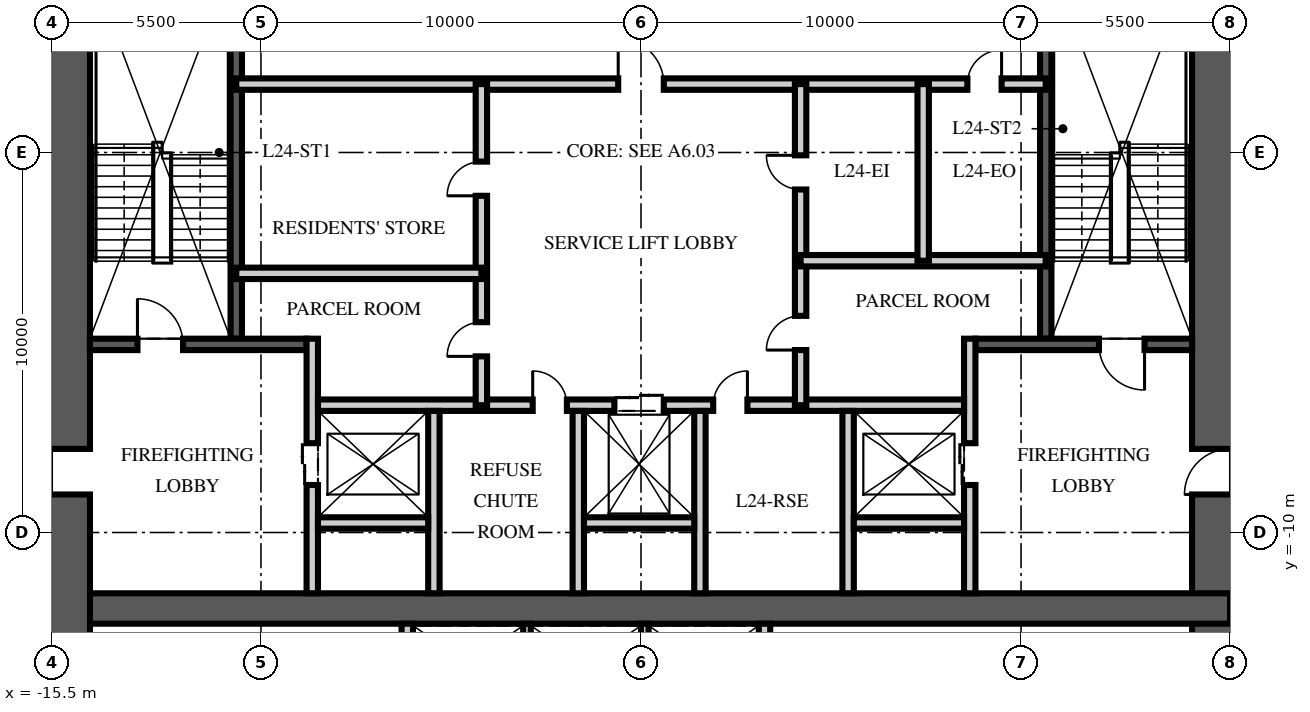
"""IFC4 building model, lengths in metres.
Left out: names, types, materials, properties, quantities, classifications, styles, units other than length and angle.
Written with IfcOpenShell. Run it as: python <this file> out.ifc"""

import sys

from ifc_helpers import new_model, si_unit, direction, frame, frame_2d, origin, place, context, subcontext, project, spatial, rectangle, extrude, element, fill, save


model = new_model("IFC4")
c1 = context("Model", 3, precision=1e-05, world=origin(), true_north=direction((0.0, 1.0)))
c2 = subcontext(c1, "Body", "Model", "MODEL_VIEW")
j1 = project(units=[si_unit("LENGTHUNIT", "METRE"), si_unit("PLANEANGLEUNIT", "RADIAN")], contexts=[c1])
p1 = place(None, origin())
s1 = spatial("IfcSite", under=j1, at=p1, CompositionType="ELEMENT")
p2 = place(p1, origin())
s2 = spatial("IfcBuilding", under=s1, at=p2, CompositionType="ELEMENT")
p3 = place(p2, frame((0.0, 0.0, 96.0)))
s3 = spatial("IfcBuildingStorey", under=s2, at=p3, CompositionType="ELEMENT", Elevation=96.0)
p4 = place(p3, frame((15.5, -15.5, -0.25), z_axis=(0.0, 0.0, 1.0), x_axis=(0.0, 1.0, 0.0)))
e1 = element("IfcWall", 1, at=p4, inside=s3, PredefinedType="SHEAR", context=c2, shape_type="SweptSolid", body=[
    extrude(rectangle(XDim=31.0, YDim=2.0, at=frame_2d((15.5, 0.0))), origin(), (0.0, 0.0, 1.0), 3.65),
])
p5 = place(p4, frame((6.5, 0.0, 0.25)))
e2 = element("IfcOpeningElement", 2, at=p5, cuts=e1, PredefinedType="OPENING", context=c2, shape_type="SweptSolid", body=[
    extrude(rectangle(XDim=1.2, YDim=2.1, at=frame_2d((0.6, 1.05))), frame((0.0, 1.01, 0.0), z_axis=(0.0, -1.0, 0.0), x_axis=(1.0, 0.0, 0.0)), (0.0, 0.0, 1.0), 2.02),
])
p6 = place(p4, frame((23.0, 0.0, 0.25)))
e3 = element("IfcOpeningElement", 3, at=p6, cuts=e1, PredefinedType="OPENING", context=c2, shape_type="SweptSolid", body=[
    extrude(rectangle(XDim=1.8, YDim=2.1, at=frame_2d((0.9, 1.05))), frame((0.0, 1.01, 0.0), z_axis=(0.0, -1.0, 0.0), x_axis=(1.0, 0.0, 0.0)), (0.0, 0.0, 1.0), 2.02),
])
p7 = place(p3, frame((-15.5, -12.0, -0.25), z_axis=(0.0, 0.0, 1.0), x_axis=(1.0, 0.0, 0.0)))
e4 = element("IfcWall", 4, at=p7, inside=s3, PredefinedType="SHEAR", context=c2, shape_type="SweptSolid", body=[
    extrude(rectangle(XDim=31.0, YDim=0.8, at=frame_2d((15.5, 0.0))), origin(), (0.0, 0.0, 1.0), 3.65),
])
p8 = place(p3, frame((-15.5, -15.5, -0.25), z_axis=(0.0, 0.0, 1.0), x_axis=(0.0, 1.0, 0.0)))
e5 = element("IfcWall", 5, at=p8, inside=s3, PredefinedType="SHEAR", context=c2, shape_type="SweptSolid", body=[
    extrude(rectangle(XDim=31.0, YDim=2.0, at=frame_2d((15.5, 0.0))), origin(), (0.0, 0.0, 1.0), 3.65),
])
p9 = place(p8, frame((6.5, 0.0, 0.25)))
e6 = element("IfcOpeningElement", 6, at=p9, cuts=e5, PredefinedType="OPENING", context=c2, shape_type="SweptSolid", body=[
    extrude(rectangle(XDim=1.2, YDim=2.1, at=frame_2d((0.6, 1.05))), frame((0.0, 1.01, 0.0), z_axis=(0.0, -1.0, 0.0), x_axis=(1.0, 0.0, 0.0)), (0.0, 0.0, 1.0), 2.02),
])
p10 = place(p8, frame((23.0, 0.0, 0.25)))
e7 = element("IfcOpeningElement", 7, at=p10, cuts=e5, PredefinedType="OPENING", context=c2, shape_type="SweptSolid", body=[
    extrude(rectangle(XDim=1.8, YDim=2.1, at=frame_2d((0.9, 1.05))), frame((0.0, 1.01, 0.0), z_axis=(0.0, -1.0, 0.0), x_axis=(1.0, 0.0, 0.0)), (0.0, 0.0, 1.0), 2.02),
])
p11 = place(p3, frame((-10.65, -4.9, 0.0), z_axis=(0.0, 0.0, 1.0), x_axis=(0.0, 1.0, 0.0)))
e8 = element("IfcWall", 8, at=p11, inside=s3, PredefinedType="SOLIDWALL", context=c2, shape_type="SweptSolid", body=[
    extrude(rectangle(XDim=10.1, YDim=0.3, at=frame_2d((5.05, 0.0))), origin(), (0.0, 0.0, 1.0), 3.4),
])
p12 = place(p3, frame((-14.5, -5.05, 0.0), z_axis=(0.0, 0.0, 1.0), x_axis=(1.0, 0.0, 0.0)))
e9 = element("IfcWall", 9, at=p12, inside=s3, PredefinedType="SOLIDWALL", context=c2, shape_type="SweptSolid", body=[
    extrude(rectangle(XDim=5.7, YDim=0.3, at=frame_2d((2.85, 0.0))), origin(), (0.0, 0.0, 1.0), 3.4),
])
p13 = place(p12, frame((1.25, 0.0, 0.0)))
e10 = element("IfcOpeningElement", 10, at=p13, cuts=e9, PredefinedType="OPENING", context=c2, shape_type="SweptSolid", body=[
    extrude(rectangle(XDim=1.2, YDim=2.1, at=frame_2d((0.6, 1.05))), frame((0.0, 0.16, 0.0), z_axis=(0.0, -1.0, 0.0), x_axis=(1.0, 0.0, 0.0)), (0.0, 0.0, 1.0), 0.32),
])
p14 = place(p3, frame((-8.65, -11.6, 0.0), z_axis=(0.0, 0.0, 1.0), x_axis=(0.0, 1.0, 0.0)))
e11 = element("IfcWall", 11, at=p14, inside=s3, PredefinedType="PARTITIONING", context=c2, shape_type="SweptSolid", body=[
    extrude(rectangle(XDim=6.7, YDim=0.3, at=frame_2d((3.35, 0.0))), origin(), (0.0, 0.0, 1.0), 3.4),
])
p15 = place(p14, frame((2.85, 0.0, 0.0)))
e12 = element("IfcOpeningElement", 12, at=p15, cuts=e11, PredefinedType="OPENING", context=c2, shape_type="SweptSolid", body=[
    extrude(rectangle(XDim=1.1, YDim=2.1, at=frame_2d((0.55, 1.05))), frame((0.0, 0.16, 0.0), z_axis=(0.0, -1.0, 0.0), x_axis=(1.0, 0.0, 0.0)), (0.0, 0.0, 1.0), 0.32),
])
p16 = place(p3, frame((10.65, -4.9, 0.0), z_axis=(0.0, 0.0, 1.0), x_axis=(0.0, 1.0, 0.0)))
e13 = element("IfcWall", 13, at=p16, inside=s3, PredefinedType="SOLIDWALL", context=c2, shape_type="SweptSolid", body=[
    extrude(rectangle(XDim=10.1, YDim=0.3, at=frame_2d((5.05, 0.0))), origin(), (0.0, 0.0, 1.0), 3.4),
])
p17 = place(p3, frame((14.5, -5.05, 0.0), z_axis=(0.0, 0.0, 1.0), x_axis=(-1.0, 0.0, 0.0)))
e14 = element("IfcWall", 14, at=p17, inside=s3, PredefinedType="SOLIDWALL", context=c2, shape_type="SweptSolid", body=[
    extrude(rectangle(XDim=5.7, YDim=0.3, at=frame_2d((2.85, 0.0))), origin(), (0.0, 0.0, 1.0), 3.4),
])
p18 = place(p17, frame((1.25, 0.0, 0.0)))
e15 = element("IfcOpeningElement", 15, at=p18, cuts=e14, PredefinedType="OPENING", context=c2, shape_type="SweptSolid", body=[
    extrude(rectangle(XDim=1.2, YDim=2.1, at=frame_2d((0.6, 1.05))), frame((0.0, 0.16, 0.0), z_axis=(0.0, -1.0, 0.0), x_axis=(1.0, 0.0, 0.0)), (0.0, 0.0, 1.0), 0.32),
])
p19 = place(p3, frame((8.65, -11.6, 0.0), z_axis=(0.0, 0.0, 1.0), x_axis=(0.0, 1.0, 0.0)))
e16 = element("IfcWall", 16, at=p19, inside=s3, PredefinedType="PARTITIONING", context=c2, shape_type="SweptSolid", body=[
    extrude(rectangle(XDim=6.7, YDim=0.3, at=frame_2d((3.35, 0.0))), origin(), (0.0, 0.0, 1.0), 3.4),
])
p20 = place(p19, frame((2.85, 0.0, 0.0)))
e17 = element("IfcOpeningElement", 17, at=p20, cuts=e16, PredefinedType="OPENING", context=c2, shape_type="SweptSolid", body=[
    extrude(rectangle(XDim=1.1, YDim=2.1, at=frame_2d((0.55, 1.05))), frame((0.0, 0.16, 0.0), z_axis=(0.0, -1.0, 0.0), x_axis=(1.0, 0.0, 0.0)), (0.0, 0.0, 1.0), 0.32),
])
p21 = place(p3, frame((-8.5, -6.65, 0.0), z_axis=(0.0, 0.0, 1.0), x_axis=(1.0, 0.0, 0.0)))
e18 = element("IfcWall", 18, at=p21, inside=s3, PredefinedType="PARTITIONING", context=c2, shape_type="SweptSolid", body=[
    extrude(rectangle(XDim=17.0, YDim=0.3, at=frame_2d((8.5, 0.0))), origin(), (0.0, 0.0, 1.0), 3.4),
])
p22 = place(p21, frame((7.8, 0.0, 0.0)))
e19 = element("IfcOpeningElement", 19, at=p22, cuts=e18, PredefinedType="OPENING", context=c2, shape_type="SweptSolid", body=[
    extrude(rectangle(XDim=1.3, YDim=2.4, at=frame_2d((0.65, 1.2))), frame((0.0, 0.16, 0.0), z_axis=(0.0, -1.0, 0.0), x_axis=(1.0, 0.0, 0.0)), (0.0, 0.0, 1.0), 0.32),
])
p23 = place(p21, frame((5.65, 0.0, 0.0)))
e20 = element("IfcOpeningElement", 20, at=p23, cuts=e18, PredefinedType="OPENING", context=c2, shape_type="SweptSolid", body=[
    extrude(rectangle(XDim=0.9, YDim=2.1, at=frame_2d((0.45, 1.05))), frame((0.0, 0.16, 0.0), z_axis=(0.0, -1.0, 0.0), x_axis=(1.0, 0.0, 0.0)), (0.0, 0.0, 1.0), 0.32),
])
p24 = place(p21, frame((10.4, 0.0, 0.0)))
e21 = element("IfcOpeningElement", 21, at=p24, cuts=e18, PredefinedType="OPENING", context=c2, shape_type="SweptSolid", body=[
    extrude(rectangle(XDim=0.9, YDim=2.1, at=frame_2d((0.45, 1.05))), frame((0.0, 0.16, 0.0), z_axis=(0.0, -1.0, 0.0), x_axis=(1.0, 0.0, 0.0)), (0.0, 0.0, 1.0), 0.32),
])
for number, where, z_axis, x_axis in (
    (22, (-5.45, -11.6, 0.0), (0.0, 0.0, 1.0), (0.0, 1.0, 0.0)),
    (23, (-1.65, -11.6, 0.0), (0.0, 0.0, 1.0), (0.0, 1.0, 0.0)),
    (24, (1.55, -11.6, 0.0), (0.0, 0.0, 1.0), (0.0, 1.0, 0.0)),
    (25, (5.45, -11.6, 0.0), (0.0, 0.0, 1.0), (0.0, 1.0, 0.0)),
):
    element("IfcWall", number, at=place(p3, frame(where, z_axis=z_axis, x_axis=x_axis)), inside=s3, PredefinedType="PARTITIONING", context=c2, shape_type="SweptSolid", body=[
        extrude(rectangle(XDim=4.8, YDim=0.3, at=frame_2d((2.4, 0.0))), origin(), (0.0, 0.0, 1.0), 3.4),
    ])
for number, where, z_axis, x_axis in (
    (26, (-8.5, -9.75, 0.0), (0.0, 0.0, 1.0), (1.0, 0.0, 0.0)),
    (27, (-1.5, -9.75, 0.0), (0.0, 0.0, 1.0), (1.0, 0.0, 0.0)),
    (28, (5.6, -9.75, 0.0), (0.0, 0.0, 1.0), (1.0, 0.0, 0.0)),
):
    element("IfcWall", number, at=place(p3, frame(where, z_axis=z_axis, x_axis=x_axis)), inside=s3, PredefinedType="PARTITIONING", context=c2, shape_type="SweptSolid", body=[
        extrude(rectangle(XDim=2.9, YDim=0.3, at=frame_2d((1.45, 0.0))), origin(), (0.0, 0.0, 1.0), 3.4),
    ])
for number, where, z_axis, x_axis in (
    (29, (-6.15, -14.5, 0.0), (0.0, 0.0, 1.0), (0.0, 1.0, 0.0)),
    (30, (3.25, -14.5, 0.0), (0.0, 0.0, 1.0), (0.0, 1.0, 0.0)),
):
    element("IfcWall", number, at=place(p3, frame(where, z_axis=z_axis, x_axis=x_axis)), inside=s3, PredefinedType="PARTITIONING", context=c2, shape_type="SweptSolid", body=[
        extrude(rectangle(XDim=2.1, YDim=0.3, at=frame_2d((1.05, 0.0))), origin(), (0.0, 0.0, 1.0), 3.4),
    ])
for number, where, z_axis, x_axis in (
    (31, (-3.0, -14.5, 0.0), (0.0, 0.0, 1.0), (0.0, 1.0, 0.0)),
    (32, (0.1, -14.5, 0.0), (0.0, 0.0, 1.0), (0.0, 1.0, 0.0)),
):
    element("IfcWall", number, at=place(p3, frame(where, z_axis=z_axis, x_axis=x_axis)), inside=s3, PredefinedType="PARTITIONING", context=c2, shape_type="SweptSolid", body=[
        extrude(rectangle(XDim=2.1, YDim=0.2, at=frame_2d((1.05, 0.0))), origin(), (0.0, 0.0, 1.0), 3.4),
    ])
p25 = place(p3, frame((-10.65, 1.8, 0.0), z_axis=(0.0, 0.0, 1.0), x_axis=(1.0, 0.0, 0.0)))
e33 = element("IfcWall", 33, at=p25, inside=s3, PredefinedType="PARTITIONING", context=c2, shape_type="SweptSolid", body=[
    extrude(rectangle(XDim=21.3, YDim=0.3, at=frame_2d((10.65, 0.0))), origin(), (0.0, 0.0, 1.0), 3.4),
])
p26 = place(p25, frame((10.05, 0.0, 0.0)))
e34 = element("IfcOpeningElement", 34, at=p26, cuts=e33, PredefinedType="OPENING", context=c2, shape_type="SweptSolid", body=[
    extrude(rectangle(XDim=1.2, YDim=2.1, at=frame_2d((0.6, 1.05))), frame((0.0, 0.16, 0.0), z_axis=(0.0, -1.0, 0.0), x_axis=(1.0, 0.0, 0.0)), (0.0, 0.0, 1.0), 0.32),
])
p27 = place(p25, frame((19.238, 0.0, 0.0)))
e35 = element("IfcOpeningElement", 35, at=p27, cuts=e33, PredefinedType="OPENING", context=c2, shape_type="SweptSolid", body=[
    extrude(rectangle(XDim=0.9, YDim=2.1, at=frame_2d((0.45, 1.05))), frame((0.0, 0.16, 0.0), z_axis=(0.0, -1.0, 0.0), x_axis=(1.0, 0.0, 0.0)), (0.0, 0.0, 1.0), 0.32),
])
p28 = place(p3, frame((-4.2, -6.65, 0.0), z_axis=(0.0, 0.0, 1.0), x_axis=(0.0, 1.0, 0.0)))
e36 = element("IfcWall", 36, at=p28, inside=s3, PredefinedType="PARTITIONING", context=c2, shape_type="SweptSolid", body=[
    extrude(rectangle(XDim=8.45, YDim=0.3, at=frame_2d((4.225, 0.0))), origin(), (0.0, 0.0, 1.0), 3.4),
])
p29 = place(p28, frame((1.285, 0.0, 0.0)))
e37 = element("IfcOpeningElement", 37, at=p29, cuts=e36, PredefinedType="OPENING", context=c2, shape_type="SweptSolid", body=[
    extrude(rectangle(XDim=0.9, YDim=2.1, at=frame_2d((0.45, 1.05))), frame((0.0, 0.16, 0.0), z_axis=(0.0, -1.0, 0.0), x_axis=(1.0, 0.0, 0.0)), (0.0, 0.0, 1.0), 0.32),
])
p30 = place(p28, frame((5.51, 0.0, 0.0)))
e38 = element("IfcOpeningElement", 38, at=p30, cuts=e36, PredefinedType="OPENING", context=c2, shape_type="SweptSolid", body=[
    extrude(rectangle(XDim=0.9, YDim=2.1, at=frame_2d((0.45, 1.05))), frame((0.0, 0.16, 0.0), z_axis=(0.0, -1.0, 0.0), x_axis=(1.0, 0.0, 0.0)), (0.0, 0.0, 1.0), 0.32),
])
p31 = place(p3, frame((4.2, -6.65, 0.0), z_axis=(0.0, 0.0, 1.0), x_axis=(0.0, 1.0, 0.0)))
e39 = element("IfcWall", 39, at=p31, inside=s3, PredefinedType="PARTITIONING", context=c2, shape_type="SweptSolid", body=[
    extrude(rectangle(XDim=8.45, YDim=0.3, at=frame_2d((4.225, 0.0))), origin(), (0.0, 0.0, 1.0), 3.4),
])
p32 = place(p31, frame((1.451, 0.0, 0.0)))
e40 = element("IfcOpeningElement", 40, at=p32, cuts=e39, PredefinedType="OPENING", context=c2, shape_type="SweptSolid", body=[
    extrude(rectangle(XDim=0.9, YDim=2.1, at=frame_2d((0.45, 1.05))), frame((0.0, 0.16, 0.0), z_axis=(0.0, -1.0, 0.0), x_axis=(1.0, 0.0, 0.0)), (0.0, 0.0, 1.0), 0.32),
])
p33 = place(p31, frame((5.676, 0.0, 0.0)))
e41 = element("IfcOpeningElement", 41, at=p33, cuts=e39, PredefinedType="OPENING", context=c2, shape_type="SweptSolid", body=[
    extrude(rectangle(XDim=0.9, YDim=2.1, at=frame_2d((0.45, 1.05))), frame((0.0, 0.16, 0.0), z_axis=(0.0, -1.0, 0.0), x_axis=(1.0, 0.0, 0.0)), (0.0, 0.0, 1.0), 0.32),
])
for number, where, z_axis, x_axis in (
    (42, (-10.65, -3.18, 0.0), (0.0, 0.0, 1.0), (1.0, 0.0, 0.0)),
    (43, (10.65, -2.848, 0.0), (0.0, 0.0, 1.0), (-1.0, 0.0, 0.0)),
):
    element("IfcWall", number, at=place(p3, frame(where, z_axis=z_axis, x_axis=x_axis)), inside=s3, PredefinedType="PARTITIONING", context=c2, shape_type="SweptSolid", body=[
        extrude(rectangle(XDim=6.45, YDim=0.3, at=frame_2d((3.225, 0.0))), origin(), (0.0, 0.0, 1.0), 3.4),
    ])
p34 = place(p3, frame((7.425, -2.848, 0.0), z_axis=(0.0, 0.0, 1.0), x_axis=(0.0, 1.0, 0.0)))
e44 = element("IfcWall", 44, at=p34, inside=s3, PredefinedType="PARTITIONING", context=c2, shape_type="SweptSolid", body=[
    extrude(rectangle(XDim=4.648, YDim=0.3, at=frame_2d((2.324, 0.0))), origin(), (0.0, 0.0, 1.0), 3.4),
])
p35 = place(p13, origin())
e45 = element("IfcDoor", 45, at=p35, inside=s3, OperationType="SINGLE_SWING_LEFT", PredefinedType="DOOR", context=c2, shape_type="SweptSolid", body=[
    extrude(rectangle(XDim=1.2, YDim=2.1, at=frame_2d((0.6, 1.05))), frame((0.0, 0.025, 0.0), z_axis=(0.0, -1.0, 0.0), x_axis=(1.0, 0.0, 0.0)), (0.0, 0.0, 1.0), 0.05),
])
fill(e10, e45)
p36 = place(p9, origin())
e46 = element("IfcDoor", 46, at=p36, inside=s3, OperationType="SINGLE_SWING_LEFT", PredefinedType="DOOR", context=c2, shape_type="SweptSolid", body=[
    extrude(rectangle(XDim=1.2, YDim=2.1, at=frame_2d((0.6, 1.05))), frame((0.0, 0.025, 0.0), z_axis=(0.0, -1.0, 0.0), x_axis=(1.0, 0.0, 0.0)), (0.0, 0.0, 1.0), 0.05),
])
fill(e6, e46)
p37 = place(p18, origin())
e47 = element("IfcDoor", 47, at=p37, inside=s3, OperationType="SINGLE_SWING_LEFT", PredefinedType="DOOR", context=c2, shape_type="SweptSolid", body=[
    extrude(rectangle(XDim=1.2, YDim=2.1, at=frame_2d((0.6, 1.05))), frame((0.0, 0.025, 0.0), z_axis=(0.0, -1.0, 0.0), x_axis=(1.0, 0.0, 0.0)), (0.0, 0.0, 1.0), 0.05),
])
fill(e15, e47)
p38 = place(p5, origin())
e48 = element("IfcDoor", 48, at=p38, inside=s3, OperationType="SINGLE_SWING_LEFT", PredefinedType="DOOR", context=c2, shape_type="SweptSolid", body=[
    extrude(rectangle(XDim=1.2, YDim=2.1, at=frame_2d((0.6, 1.05))), frame((0.0, 0.025, 0.0), z_axis=(0.0, -1.0, 0.0), x_axis=(1.0, 0.0, 0.0)), (0.0, 0.0, 1.0), 0.05),
])
fill(e2, e48)
p39 = place(p15, origin())
e49 = element("IfcDoor", 49, at=p39, inside=s3, OperationType="DOUBLE_DOOR_SLIDING", PredefinedType="DOOR", context=c2, shape_type="SweptSolid", body=[
    extrude(rectangle(XDim=1.1, YDim=2.1, at=frame_2d((0.55, 1.05))), frame((0.0, 0.025, 0.0), z_axis=(0.0, -1.0, 0.0), x_axis=(1.0, 0.0, 0.0)), (0.0, 0.0, 1.0), 0.05),
])
fill(e12, e49)
p40 = place(p20, origin())
e50 = element("IfcDoor", 50, at=p40, inside=s3, OperationType="DOUBLE_DOOR_SLIDING", PredefinedType="DOOR", context=c2, shape_type="SweptSolid", body=[
    extrude(rectangle(XDim=1.1, YDim=2.1, at=frame_2d((0.55, 1.05))), frame((0.0, 0.025, 0.0), z_axis=(0.0, -1.0, 0.0), x_axis=(1.0, 0.0, 0.0)), (0.0, 0.0, 1.0), 0.05),
])
fill(e17, e50)
p41 = place(p22, origin())
e51 = element("IfcDoor", 51, at=p41, inside=s3, OperationType="DOUBLE_DOOR_SLIDING", PredefinedType="DOOR", context=c2, shape_type="SweptSolid", body=[
    extrude(rectangle(XDim=1.3, YDim=2.4, at=frame_2d((0.65, 1.2))), frame((0.0, 0.025, 0.0), z_axis=(0.0, -1.0, 0.0), x_axis=(1.0, 0.0, 0.0)), (0.0, 0.0, 1.0), 0.05),
])
fill(e19, e51)
p42 = place(p26, origin())
e52 = element("IfcDoor", 52, at=p42, inside=s3, OperationType="SINGLE_SWING_LEFT", PredefinedType="DOOR", context=c2, shape_type="SweptSolid", body=[
    extrude(rectangle(XDim=1.2, YDim=2.1, at=frame_2d((0.6, 1.05))), frame((0.0, 0.025, 0.0), z_axis=(0.0, -1.0, 0.0), x_axis=(1.0, 0.0, 0.0)), (0.0, 0.0, 1.0), 0.05),
])
fill(e34, e52)
p43 = place(p23, origin())
e53 = element("IfcDoor", 53, at=p43, inside=s3, OperationType="SINGLE_SWING_LEFT", PredefinedType="DOOR", context=c2, shape_type="SweptSolid", body=[
    extrude(rectangle(XDim=0.9, YDim=2.1, at=frame_2d((0.45, 1.05))), frame((0.0, 0.025, 0.0), z_axis=(0.0, -1.0, 0.0), x_axis=(1.0, 0.0, 0.0)), (0.0, 0.0, 1.0), 0.05),
])
fill(e20, e53)
p44 = place(p24, origin())
e54 = element("IfcDoor", 54, at=p44, inside=s3, OperationType="SINGLE_SWING_RIGHT", PredefinedType="DOOR", context=c2, shape_type="SweptSolid", body=[
    extrude(rectangle(XDim=0.9, YDim=2.1, at=frame_2d((0.45, 1.05))), frame((0.0, 0.025, 0.0), z_axis=(0.0, -1.0, 0.0), x_axis=(1.0, 0.0, 0.0)), (0.0, 0.0, 1.0), 0.05),
])
fill(e21, e54)
p45 = place(p29, origin())
e55 = element("IfcDoor", 55, at=p45, inside=s3, OperationType="SINGLE_SWING_LEFT", PredefinedType="DOOR", context=c2, shape_type="SweptSolid", body=[
    extrude(rectangle(XDim=0.9, YDim=2.1, at=frame_2d((0.45, 1.05))), frame((0.0, 0.025, 0.0), z_axis=(0.0, -1.0, 0.0), x_axis=(1.0, 0.0, 0.0)), (0.0, 0.0, 1.0), 0.05),
])
fill(e37, e55)
p46 = place(p30, origin())
e56 = element("IfcDoor", 56, at=p46, inside=s3, OperationType="SINGLE_SWING_LEFT", PredefinedType="DOOR", context=c2, shape_type="SweptSolid", body=[
    extrude(rectangle(XDim=0.9, YDim=2.1, at=frame_2d((0.45, 1.05))), frame((0.0, 0.025, 0.0), z_axis=(0.0, -1.0, 0.0), x_axis=(1.0, 0.0, 0.0)), (0.0, 0.0, 1.0), 0.05),
])
fill(e38, e56)
p47 = place(p32, origin())
e57 = element("IfcDoor", 57, at=p47, inside=s3, OperationType="SINGLE_SWING_LEFT", PredefinedType="DOOR", context=c2, shape_type="SweptSolid", body=[
    extrude(rectangle(XDim=0.9, YDim=2.1, at=frame_2d((0.45, 1.05))), frame((0.0, 0.025, 0.0), z_axis=(0.0, -1.0, 0.0), x_axis=(1.0, 0.0, 0.0)), (0.0, 0.0, 1.0), 0.05),
])
fill(e40, e57)
p48 = place(p33, origin())
e58 = element("IfcDoor", 58, at=p48, inside=s3, OperationType="SINGLE_SWING_RIGHT", PredefinedType="DOOR", context=c2, shape_type="SweptSolid", body=[
    extrude(rectangle(XDim=0.9, YDim=2.1, at=frame_2d((0.45, 1.05))), frame((0.0, 0.025, 0.0), z_axis=(0.0, -1.0, 0.0), x_axis=(1.0, 0.0, 0.0)), (0.0, 0.0, 1.0), 0.05),
])
fill(e41, e58)
p49 = place(p27, origin())
e59 = element("IfcDoor", 59, at=p49, inside=s3, OperationType="SINGLE_SWING_RIGHT", PredefinedType="DOOR", context=c2, shape_type="SweptSolid", body=[
    extrude(rectangle(XDim=0.9, YDim=2.1, at=frame_2d((0.45, 1.05))), frame((0.0, 0.025, 0.0), z_axis=(0.0, -1.0, 0.0), x_axis=(1.0, 0.0, 0.0)), (0.0, 0.0, 1.0), 0.05),
])
fill(e35, e59)
save(model, sys.argv[1])
